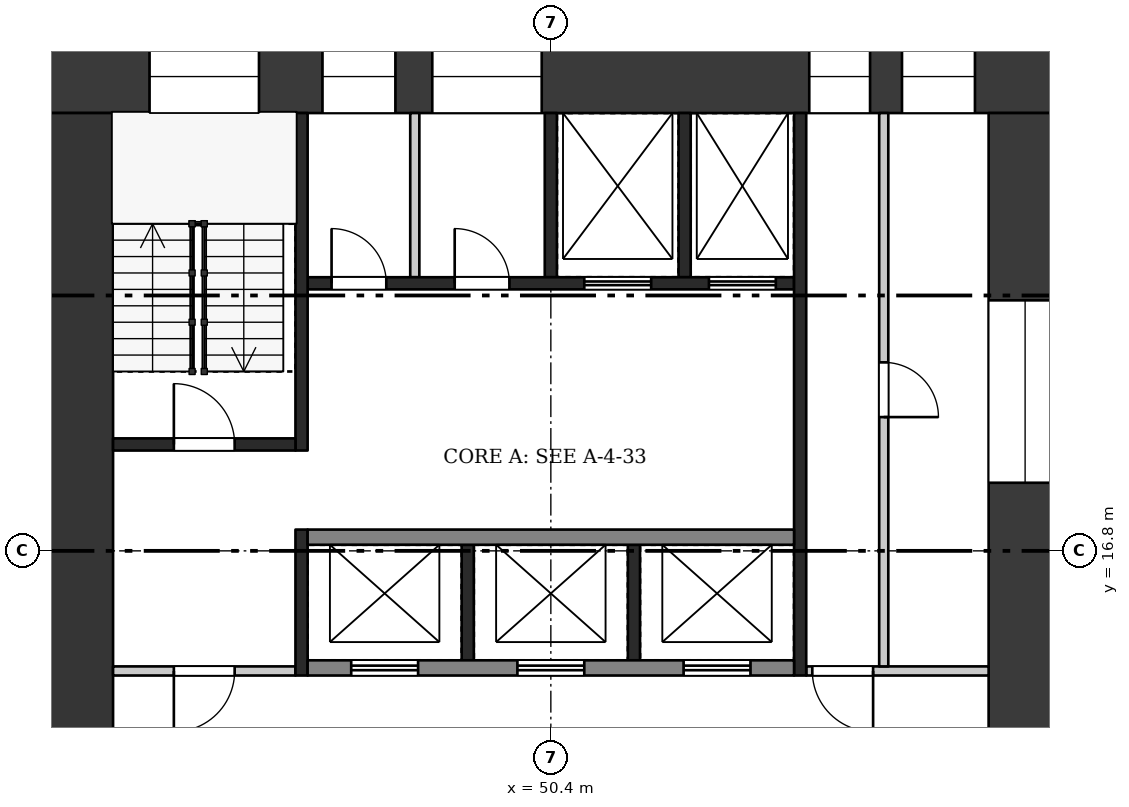
"""IFC4 building model, lengths in metres.
Left out: names, types, materials, properties, quantities, classifications, styles, units other than length and angle.
Written with IfcOpenShell. Run it as: python <this file> out.ifc"""

import sys

from ifc_helpers import new_model, si_unit, direction, frame, frame_2d, origin, place, context, subcontext, project, spatial, rectangle, extrude, element, fill, save


model = new_model("IFC4")
c1 = context("Model", 3, precision=1e-05, world=origin(), true_north=direction((0.0, 1.0)))
c2 = subcontext(c1, "Body", "Model", "MODEL_VIEW")
j1 = project(units=[si_unit("LENGTHUNIT", "METRE"), si_unit("PLANEANGLEUNIT", "RADIAN")], contexts=[c1])
p1 = place(None, origin())
s1 = spatial("IfcSite", under=j1, at=p1, CompositionType="ELEMENT")
p2 = place(p1, origin())
s2 = spatial("IfcBuilding", under=s1, at=p2, CompositionType="ELEMENT")
p3 = place(p2, frame((0.0, 0.0, 245.7)))
s3 = spatial("IfcBuildingStorey", under=s2, at=p3, CompositionType="ELEMENT", Elevation=245.7)
p4 = place(p3, frame((42.0, 24.6, 0.0), z_axis=(0.0, 0.0, 1.0), x_axis=(1.0, 0.0, 0.0)))
e1 = element("IfcWall", 1, at=p4, inside=s3, PredefinedType="SHEAR", context=c2, shape_type="SweptSolid", body=[
    extrude(rectangle(XDim=16.8, YDim=1.2, at=frame_2d((8.4, 0.0))), origin(), (0.0, 0.0, 1.0), 3.22),
])
p5 = place(p4, frame((1.8, 0.0, 0.5)))
e2 = element("IfcOpeningElement", 2, at=p5, cuts=e1, PredefinedType="OPENING", context=c2, shape_type="SweptSolid", body=[
    extrude(rectangle(XDim=1.8, YDim=2.4, at=frame_2d((0.9, 1.2))), frame((0.0, 0.61, 0.0), z_axis=(0.0, -1.0, 0.0), x_axis=(1.0, 0.0, 0.0)), (0.0, 0.0, 1.0), 1.22),
])
p6 = place(p4, frame((4.644, 0.0, 1.6)))
e3 = element("IfcOpeningElement", 3, at=p6, cuts=e1, PredefinedType="OPENING", context=c2, shape_type="SweptSolid", body=[
    extrude(rectangle(XDim=1.2, YDim=1.2, at=frame_2d((0.6, 0.6))), frame((0.0, 0.61, 0.0), z_axis=(0.0, -1.0, 0.0), x_axis=(1.0, 0.0, 0.0)), (0.0, 0.0, 1.0), 1.22),
])
p7 = place(p4, frame((6.45, 0.0, 1.6)))
e4 = element("IfcOpeningElement", 4, at=p7, cuts=e1, PredefinedType="OPENING", context=c2, shape_type="SweptSolid", body=[
    extrude(rectangle(XDim=1.8, YDim=1.2, at=frame_2d((0.9, 0.6))), frame((0.0, 0.61, 0.0), z_axis=(0.0, -1.0, 0.0), x_axis=(1.0, 0.0, 0.0)), (0.0, 0.0, 1.0), 1.22),
])
p8 = place(p4, frame((12.65, 0.0, 0.6)))
e5 = element("IfcOpeningElement", 5, at=p8, cuts=e1, PredefinedType="OPENING", context=c2, shape_type="SweptSolid", body=[
    extrude(rectangle(XDim=1.0, YDim=2.1, at=frame_2d((0.5, 1.05))), frame((0.0, 0.61, 0.0), z_axis=(0.0, -1.0, 0.0), x_axis=(1.0, 0.0, 0.0)), (0.0, 0.0, 1.0), 1.22),
])
p9 = place(p4, frame((14.175, 0.0, 1.6)))
e6 = element("IfcOpeningElement", 6, at=p9, cuts=e1, PredefinedType="OPENING", context=c2, shape_type="SweptSolid", body=[
    extrude(rectangle(XDim=1.2, YDim=1.2, at=frame_2d((0.6, 0.6))), frame((0.0, 0.61, 0.0), z_axis=(0.0, -1.0, 0.0), x_axis=(1.0, 0.0, 0.0)), (0.0, 0.0, 1.0), 1.22),
])
p10 = place(p3, frame((42.6, 9.6, 0.0), z_axis=(0.0, 0.0, 1.0), x_axis=(0.0, 1.0, 0.0)))
e7 = element("IfcWall", 7, at=p10, inside=s3, PredefinedType="SHEAR", context=c2, shape_type="SweptSolid", body=[
    extrude(rectangle(XDim=14.4, YDim=1.2, at=frame_2d((7.2, 0.0))), origin(), (0.0, 0.0, 1.0), 3.22),
])
p11 = place(p10, frame((2.1, 0.0, 0.0)))
e8 = element("IfcOpeningElement", 8, at=p11, cuts=e7, PredefinedType="OPENING", context=c2, shape_type="SweptSolid", body=[
    extrude(rectangle(XDim=1.8, YDim=2.1, at=frame_2d((0.9, 1.05))), frame((0.0, 0.61, 0.0), z_axis=(0.0, -1.0, 0.0), x_axis=(1.0, 0.0, 0.0)), (0.0, 0.0, 1.0), 1.22),
])
p12 = place(p3, frame((58.2, 9.6, 0.0), z_axis=(0.0, 0.0, 1.0), x_axis=(0.0, 1.0, 0.0)))
e9 = element("IfcWall", 9, at=p12, inside=s3, PredefinedType="SHEAR", context=c2, shape_type="SweptSolid", body=[
    extrude(rectangle(XDim=14.4, YDim=1.2, at=frame_2d((7.2, 0.0))), origin(), (0.0, 0.0, 1.0), 3.22),
])
p13 = place(p12, frame((1.105, 0.0, 0.6)))
e10 = element("IfcOpeningElement", 10, at=p13, cuts=e9, PredefinedType="OPENING", context=c2, shape_type="SweptSolid", body=[
    extrude(rectangle(XDim=3.0, YDim=2.1, at=frame_2d((1.5, 1.05))), frame((0.0, 0.61, 0.0), z_axis=(0.0, -1.0, 0.0), x_axis=(1.0, 0.0, 0.0)), (0.0, 0.0, 1.0), 1.22),
])
p14 = place(p12, frame((8.32, 0.0, 1.6)))
e11 = element("IfcOpeningElement", 11, at=p14, cuts=e9, PredefinedType="OPENING", context=c2, shape_type="SweptSolid", body=[
    extrude(rectangle(XDim=3.0, YDim=1.2, at=frame_2d((1.5, 0.6))), frame((0.0, 0.61, 0.0), z_axis=(0.0, -1.0, 0.0), x_axis=(1.0, 0.0, 0.0)), (0.0, 0.0, 1.0), 1.22),
])
for number, where, z_axis, x_axis in (
    (12, (49.033, 15.0, 0.0), (0.0, 0.0, 1.0), (0.0, 1.0, 0.0)),
    (13, (51.767, 15.0, 0.0), (0.0, 0.0, 1.0), (0.0, 1.0, 0.0)),
):
    element("IfcWall", number, at=place(p3, frame(where, z_axis=z_axis, x_axis=x_axis)), inside=s3, PredefinedType="SHEAR", context=c2, shape_type="SweptSolid", body=[
        extrude(rectangle(XDim=1.9, YDim=0.2, at=frame_2d((0.95, 0.0))), origin(), (0.0, 0.0, 1.0), 3.22),
    ])
p15 = place(p3, frame((46.4, 14.875, 0.0), z_axis=(0.0, 0.0, 1.0), x_axis=(1.0, 0.0, 0.0)))
e14 = element("IfcWall", 14, at=p15, inside=s3, PredefinedType="SHEAR", context=c2, shape_type="SweptSolid", body=[
    extrude(rectangle(XDim=8.0, YDim=0.25, at=frame_2d((4.0, 0.0))), origin(), (0.0, 0.0, 1.0), 3.22),
])
p16 = place(p15, frame((0.717, 0.0, 0.0)))
e15 = element("IfcOpeningElement", 15, at=p16, cuts=e14, PredefinedType="OPENING", context=c2, shape_type="SweptSolid", body=[
    extrude(rectangle(XDim=1.1, YDim=2.1, at=frame_2d((0.55, 1.05))), frame((0.0, 0.135, 0.0), z_axis=(0.0, -1.0, 0.0), x_axis=(1.0, 0.0, 0.0)), (0.0, 0.0, 1.0), 0.27),
])
p17 = place(p15, frame((3.45, 0.0, 0.0)))
e16 = element("IfcOpeningElement", 16, at=p17, cuts=e14, PredefinedType="OPENING", context=c2, shape_type="SweptSolid", body=[
    extrude(rectangle(XDim=1.1, YDim=2.1, at=frame_2d((0.55, 1.05))), frame((0.0, 0.135, 0.0), z_axis=(0.0, -1.0, 0.0), x_axis=(1.0, 0.0, 0.0)), (0.0, 0.0, 1.0), 0.27),
])
p18 = place(p15, frame((6.183, 0.0, 0.0)))
e17 = element("IfcOpeningElement", 17, at=p18, cuts=e14, PredefinedType="OPENING", context=c2, shape_type="SweptSolid", body=[
    extrude(rectangle(XDim=1.1, YDim=2.1, at=frame_2d((0.55, 1.05))), frame((0.0, 0.135, 0.0), z_axis=(0.0, -1.0, 0.0), x_axis=(1.0, 0.0, 0.0)), (0.0, 0.0, 1.0), 0.27),
])
p19 = place(p3, frame((46.4, 17.025, 0.0), z_axis=(0.0, 0.0, 1.0), x_axis=(1.0, 0.0, 0.0)))
e18 = element("IfcWall", 18, at=p19, inside=s3, PredefinedType="SHEAR", context=c2, shape_type="SweptSolid", body=[
    extrude(rectangle(XDim=8.0, YDim=0.25, at=frame_2d((4.0, 0.0))), origin(), (0.0, 0.0, 1.0), 3.22),
])
for number, where, z_axis, x_axis in (
    (19, (50.4, 21.3, 0.0), (0.0, 0.0, 1.0), (0.0, 1.0, 0.0)),
    (20, (52.6, 21.3, 0.0), (0.0, 0.0, 1.0), (0.0, 1.0, 0.0)),
):
    element("IfcWall", number, at=place(p3, frame(where, z_axis=z_axis, x_axis=x_axis)), inside=s3, PredefinedType="SHEAR", context=c2, shape_type="SweptSolid", body=[
        extrude(rectangle(XDim=2.7, YDim=0.2, at=frame_2d((1.35, 0.0))), origin(), (0.0, 0.0, 1.0), 3.22),
    ])
p20 = place(p3, frame((48.163, 21.3, 0.0), z_axis=(0.0, 0.0, 1.0), x_axis=(0.0, 1.0, 0.0)))
e21 = element("IfcWall", 21, at=p20, inside=s3, PredefinedType="PARTITIONING", context=c2, shape_type="SweptSolid", body=[
    extrude(rectangle(XDim=2.7, YDim=0.15, at=frame_2d((1.35, 0.0))), origin(), (0.0, 0.0, 1.0), 3.22),
])
p21 = place(p3, frame((46.4, 21.2, 0.0), z_axis=(0.0, 0.0, 1.0), x_axis=(1.0, 0.0, 0.0)))
e22 = element("IfcWall", 22, at=p21, inside=s3, PredefinedType="SHEAR", context=c2, shape_type="SweptSolid", body=[
    extrude(rectangle(XDim=8.0, YDim=0.2, at=frame_2d((4.0, 0.0))), origin(), (0.0, 0.0, 1.0), 3.22),
])
p22 = place(p21, frame((0.394, 0.0, 0.0)))
e23 = element("IfcOpeningElement", 23, at=p22, cuts=e22, PredefinedType="OPENING", context=c2, shape_type="SweptSolid", body=[
    extrude(rectangle(XDim=0.9, YDim=2.1, at=frame_2d((0.45, 1.05))), frame((0.0, 0.11, 0.0), z_axis=(0.0, -1.0, 0.0), x_axis=(1.0, 0.0, 0.0)), (0.0, 0.0, 1.0), 0.22),
])
p23 = place(p21, frame((2.419, 0.0, 0.0)))
e24 = element("IfcOpeningElement", 24, at=p23, cuts=e22, PredefinedType="OPENING", context=c2, shape_type="SweptSolid", body=[
    extrude(rectangle(XDim=0.9, YDim=2.1, at=frame_2d((0.45, 1.05))), frame((0.0, 0.11, 0.0), z_axis=(0.0, -1.0, 0.0), x_axis=(1.0, 0.0, 0.0)), (0.0, 0.0, 1.0), 0.22),
])
p24 = place(p21, frame((4.55, 0.0, 0.0)))
e25 = element("IfcOpeningElement", 25, at=p24, cuts=e22, PredefinedType="OPENING", context=c2, shape_type="SweptSolid", body=[
    extrude(rectangle(XDim=1.1, YDim=2.1, at=frame_2d((0.55, 1.05))), frame((0.0, 0.11, 0.0), z_axis=(0.0, -1.0, 0.0), x_axis=(1.0, 0.0, 0.0)), (0.0, 0.0, 1.0), 0.22),
])
p25 = place(p21, frame((6.6, 0.0, 0.0)))
e26 = element("IfcOpeningElement", 26, at=p25, cuts=e22, PredefinedType="OPENING", context=c2, shape_type="SweptSolid", body=[
    extrude(rectangle(XDim=1.1, YDim=2.1, at=frame_2d((0.55, 1.05))), frame((0.0, 0.11, 0.0), z_axis=(0.0, -1.0, 0.0), x_axis=(1.0, 0.0, 0.0)), (0.0, 0.0, 1.0), 0.22),
])
p26 = place(p3, frame((46.3, 14.75, 0.0), z_axis=(0.0, 0.0, 1.0), x_axis=(0.0, 1.0, 0.0)))
e27 = element("IfcWall", 27, at=p26, inside=s3, PredefinedType="SHEAR", context=c2, shape_type="SweptSolid", body=[
    extrude(rectangle(XDim=2.4, YDim=0.2, at=frame_2d((1.2, 0.0))), origin(), (0.0, 0.0, 1.0), 3.22),
])
p27 = place(p3, frame((46.3, 18.45, 0.0), z_axis=(0.0, 0.0, 1.0), x_axis=(0.0, 1.0, 0.0)))
e28 = element("IfcWall", 28, at=p27, inside=s3, PredefinedType="SHEAR", context=c2, shape_type="SweptSolid", body=[
    extrude(rectangle(XDim=5.55, YDim=0.2, at=frame_2d((2.775, 0.0))), origin(), (0.0, 0.0, 1.0), 3.22),
])
p28 = place(p3, frame((43.2, 14.825, 0.0), z_axis=(0.0, 0.0, 1.0), x_axis=(1.0, 0.0, 0.0)))
e29 = element("IfcWall", 29, at=p28, inside=s3, PredefinedType="PARTITIONING", context=c2, shape_type="SweptSolid", body=[
    extrude(rectangle(XDim=3.0, YDim=0.15, at=frame_2d((1.5, 0.0))), origin(), (0.0, 0.0, 1.0), 3.22),
])
p29 = place(p28, frame((1.0, 0.0, 0.0)))
e30 = element("IfcOpeningElement", 30, at=p29, cuts=e29, PredefinedType="OPENING", context=c2, shape_type="SweptSolid", body=[
    extrude(rectangle(XDim=1.0, YDim=2.1, at=frame_2d((0.5, 1.05))), frame((0.0, 0.085, 0.0), z_axis=(0.0, -1.0, 0.0), x_axis=(1.0, 0.0, 0.0)), (0.0, 0.0, 1.0), 0.17),
])
p30 = place(p3, frame((43.2, 18.55, 0.0), z_axis=(0.0, 0.0, 1.0), x_axis=(1.0, 0.0, 0.0)))
e31 = element("IfcWall", 31, at=p30, inside=s3, PredefinedType="SHEAR", context=c2, shape_type="SweptSolid", body=[
    extrude(rectangle(XDim=3.0, YDim=0.2, at=frame_2d((1.5, 0.0))), origin(), (0.0, 0.0, 1.0), 3.22),
])
p31 = place(p30, frame((1.0, 0.0, 0.0)))
e32 = element("IfcOpeningElement", 32, at=p31, cuts=e31, PredefinedType="OPENING", context=c2, shape_type="SweptSolid", body=[
    extrude(rectangle(XDim=1.0, YDim=2.1, at=frame_2d((0.5, 1.05))), frame((0.0, 0.11, 0.0), z_axis=(0.0, -1.0, 0.0), x_axis=(1.0, 0.0, 0.0)), (0.0, 0.0, 1.0), 0.22),
])
p32 = place(p3, frame((54.5, 14.75, 0.0), z_axis=(0.0, 0.0, 1.0), x_axis=(0.0, 1.0, 0.0)))
e33 = element("IfcWall", 33, at=p32, inside=s3, PredefinedType="SHEAR", context=c2, shape_type="SweptSolid", body=[
    extrude(rectangle(XDim=9.25, YDim=0.2, at=frame_2d((4.625, 0.0))), origin(), (0.0, 0.0, 1.0), 3.22),
])
p33 = place(p3, frame((54.6, 14.825, 0.0), z_axis=(0.0, 0.0, 1.0), x_axis=(1.0, 0.0, 0.0)))
e34 = element("IfcWall", 34, at=p33, inside=s3, PredefinedType="PARTITIONING", context=c2, shape_type="SweptSolid", body=[
    extrude(rectangle(XDim=3.0, YDim=0.15, at=frame_2d((1.5, 0.0))), origin(), (0.0, 0.0, 1.0), 3.22),
])
p34 = place(p33, frame((0.1, 0.0, 0.0)))
e35 = element("IfcOpeningElement", 35, at=p34, cuts=e34, PredefinedType="OPENING", context=c2, shape_type="SweptSolid", body=[
    extrude(rectangle(XDim=1.0, YDim=2.1, at=frame_2d((0.5, 1.05))), frame((0.0, 0.085, 0.0), z_axis=(0.0, -1.0, 0.0), x_axis=(1.0, 0.0, 0.0)), (0.0, 0.0, 1.0), 0.17),
])
p35 = place(p3, frame((55.875, 14.9, 0.0), z_axis=(0.0, 0.0, 1.0), x_axis=(0.0, 1.0, 0.0)))
e36 = element("IfcWall", 36, at=p35, inside=s3, PredefinedType="PARTITIONING", context=c2, shape_type="SweptSolid", body=[
    extrude(rectangle(XDim=9.1, YDim=0.15, at=frame_2d((4.55, 0.0))), origin(), (0.0, 0.0, 1.0), 3.22),
])
p36 = place(p35, frame((4.1, 0.0, 0.0)))
e37 = element("IfcOpeningElement", 37, at=p36, cuts=e36, PredefinedType="OPENING", context=c2, shape_type="SweptSolid", body=[
    extrude(rectangle(XDim=0.9, YDim=2.1, at=frame_2d((0.45, 1.05))), frame((0.0, 0.085, 0.0), z_axis=(0.0, -1.0, 0.0), x_axis=(1.0, 0.0, 0.0)), (0.0, 0.0, 1.0), 0.17),
])
p37 = place(p16, origin())
e38 = element("IfcDoor", 38, at=p37, inside=s3, OperationType="DOUBLE_DOOR_SLIDING", PredefinedType="DOOR", context=c2, shape_type="SweptSolid", body=[
    extrude(rectangle(XDim=1.1, YDim=2.1, at=frame_2d((0.55, 1.05))), frame((0.0, 0.025, 0.0), z_axis=(0.0, -1.0, 0.0), x_axis=(1.0, 0.0, 0.0)), (0.0, 0.0, 1.0), 0.05),
])
fill(e15, e38)
p38 = place(p17, origin())
e39 = element("IfcDoor", 39, at=p38, inside=s3, OperationType="DOUBLE_DOOR_SLIDING", PredefinedType="DOOR", context=c2, shape_type="SweptSolid", body=[
    extrude(rectangle(XDim=1.1, YDim=2.1, at=frame_2d((0.55, 1.05))), frame((0.0, 0.025, 0.0), z_axis=(0.0, -1.0, 0.0), x_axis=(1.0, 0.0, 0.0)), (0.0, 0.0, 1.0), 0.05),
])
fill(e16, e39)
p39 = place(p18, origin())
e40 = element("IfcDoor", 40, at=p39, inside=s3, OperationType="DOUBLE_DOOR_SLIDING", PredefinedType="DOOR", context=c2, shape_type="SweptSolid", body=[
    extrude(rectangle(XDim=1.1, YDim=2.1, at=frame_2d((0.55, 1.05))), frame((0.0, 0.025, 0.0), z_axis=(0.0, -1.0, 0.0), x_axis=(1.0, 0.0, 0.0)), (0.0, 0.0, 1.0), 0.05),
])
fill(e17, e40)
p40 = place(p22, origin())
e41 = element("IfcDoor", 41, at=p40, inside=s3, OperationType="SINGLE_SWING_LEFT", PredefinedType="DOOR", context=c2, shape_type="SweptSolid", body=[
    extrude(rectangle(XDim=0.9, YDim=2.1, at=frame_2d((0.45, 1.05))), frame((0.0, 0.025, 0.0), z_axis=(0.0, -1.0, 0.0), x_axis=(1.0, 0.0, 0.0)), (0.0, 0.0, 1.0), 0.05),
])
fill(e23, e41)
p41 = place(p23, origin())
e42 = element("IfcDoor", 42, at=p41, inside=s3, OperationType="SINGLE_SWING_LEFT", PredefinedType="DOOR", context=c2, shape_type="SweptSolid", body=[
    extrude(rectangle(XDim=0.9, YDim=2.1, at=frame_2d((0.45, 1.05))), frame((0.0, 0.025, 0.0), z_axis=(0.0, -1.0, 0.0), x_axis=(1.0, 0.0, 0.0)), (0.0, 0.0, 1.0), 0.05),
])
fill(e24, e42)
p42 = place(p24, origin())
e43 = element("IfcDoor", 43, at=p42, inside=s3, OperationType="DOUBLE_DOOR_SLIDING", PredefinedType="DOOR", context=c2, shape_type="SweptSolid", body=[
    extrude(rectangle(XDim=1.1, YDim=2.1, at=frame_2d((0.55, 1.05))), frame((0.0, 0.025, 0.0), z_axis=(0.0, -1.0, 0.0), x_axis=(1.0, 0.0, 0.0)), (0.0, 0.0, 1.0), 0.05),
])
fill(e25, e43)
p43 = place(p25, origin())
e44 = element("IfcDoor", 44, at=p43, inside=s3, OperationType="DOUBLE_DOOR_SLIDING", PredefinedType="DOOR", context=c2, shape_type="SweptSolid", body=[
    extrude(rectangle(XDim=1.1, YDim=2.1, at=frame_2d((0.55, 1.05))), frame((0.0, 0.025, 0.0), z_axis=(0.0, -1.0, 0.0), x_axis=(1.0, 0.0, 0.0)), (0.0, 0.0, 1.0), 0.05),
])
fill(e26, e44)
p44 = place(p29, frame((1.0, 0.0, 0.0), z_axis=(0.0, 0.0, 1.0), x_axis=(-1.0, 0.0, 0.0)))
e45 = element("IfcDoor", 45, at=p44, inside=s3, OperationType="SINGLE_SWING_RIGHT", PredefinedType="DOOR", context=c2, shape_type="SweptSolid", body=[
    extrude(rectangle(XDim=1.0, YDim=2.1, at=frame_2d((0.5, 1.05))), frame((0.0, 0.025, 0.0), z_axis=(0.0, -1.0, 0.0), x_axis=(1.0, 0.0, 0.0)), (0.0, 0.0, 1.0), 0.05),
])
fill(e30, e45)
p45 = place(p31, origin())
e46 = element("IfcDoor", 46, at=p45, inside=s3, OperationType="SINGLE_SWING_LEFT", PredefinedType="DOOR", context=c2, shape_type="SweptSolid", body=[
    extrude(rectangle(XDim=1.0, YDim=2.1, at=frame_2d((0.5, 1.05))), frame((0.0, 0.025, 0.0), z_axis=(0.0, -1.0, 0.0), x_axis=(1.0, 0.0, 0.0)), (0.0, 0.0, 1.0), 0.05),
])
fill(e32, e46)
p46 = place(p34, frame((1.0, 0.0, 0.0), z_axis=(0.0, 0.0, 1.0), x_axis=(-1.0, 0.0, 0.0)))
e47 = element("IfcDoor", 47, at=p46, inside=s3, OperationType="SINGLE_SWING_LEFT", PredefinedType="DOOR", context=c2, shape_type="SweptSolid", body=[
    extrude(rectangle(XDim=1.0, YDim=2.1, at=frame_2d((0.5, 1.05))), frame((0.0, 0.025, 0.0), z_axis=(0.0, -1.0, 0.0), x_axis=(1.0, 0.0, 0.0)), (0.0, 0.0, 1.0), 0.05),
])
fill(e35, e47)
p47 = place(p36, frame((0.9, 0.0, 0.0), z_axis=(0.0, 0.0, 1.0), x_axis=(-1.0, 0.0, 0.0)))
e48 = element("IfcDoor", 48, at=p47, inside=s3, OperationType="SINGLE_SWING_RIGHT", PredefinedType="DOOR", context=c2, shape_type="SweptSolid", body=[
    extrude(rectangle(XDim=0.9, YDim=2.1, at=frame_2d((0.45, 1.05))), frame((0.0, 0.025, 0.0), z_axis=(0.0, -1.0, 0.0), x_axis=(1.0, 0.0, 0.0)), (0.0, 0.0, 1.0), 0.05),
])
fill(e37, e48)
p48 = place(p5, origin())
e49 = element("IfcWindow", 49, at=p48, inside=s3, PartitioningType="SINGLE_PANEL", PredefinedType="WINDOW", context=c2, shape_type="SweptSolid", body=[
    extrude(rectangle(XDim=1.8, YDim=2.4, at=frame_2d((0.9, 1.2))), frame((0.0, 0.03, 0.0), z_axis=(0.0, -1.0, 0.0), x_axis=(1.0, 0.0, 0.0)), (0.0, 0.0, 1.0), 0.06),
])
fill(e2, e49)
p49 = place(p6, origin())
e50 = element("IfcWindow", 50, at=p49, inside=s3, PartitioningType="SINGLE_PANEL", PredefinedType="WINDOW", context=c2, shape_type="SweptSolid", body=[
    extrude(rectangle(XDim=1.2, YDim=1.2, at=frame_2d((0.6, 0.6))), frame((0.0, 0.03, 0.0), z_axis=(0.0, -1.0, 0.0), x_axis=(1.0, 0.0, 0.0)), (0.0, 0.0, 1.0), 0.06),
])
fill(e3, e50)
p50 = place(p7, origin())
e51 = element("IfcWindow", 51, at=p50, inside=s3, PartitioningType="SINGLE_PANEL", PredefinedType="WINDOW", context=c2, shape_type="SweptSolid", body=[
    extrude(rectangle(XDim=1.8, YDim=1.2, at=frame_2d((0.9, 0.6))), frame((0.0, 0.03, 0.0), z_axis=(0.0, -1.0, 0.0), x_axis=(1.0, 0.0, 0.0)), (0.0, 0.0, 1.0), 0.06),
])
fill(e4, e51)
p51 = place(p8, origin())
e52 = element("IfcWindow", 52, at=p51, inside=s3, PartitioningType="SINGLE_PANEL", PredefinedType="WINDOW", context=c2, shape_type="SweptSolid", body=[
    extrude(rectangle(XDim=1.0, YDim=2.1, at=frame_2d((0.5, 1.05))), frame((0.0, 0.03, 0.0), z_axis=(0.0, -1.0, 0.0), x_axis=(1.0, 0.0, 0.0)), (0.0, 0.0, 1.0), 0.06),
])
fill(e5, e52)
p52 = place(p9, origin())
e53 = element("IfcWindow", 53, at=p52, inside=s3, PartitioningType="SINGLE_PANEL", PredefinedType="WINDOW", context=c2, shape_type="SweptSolid", body=[
    extrude(rectangle(XDim=1.2, YDim=1.2, at=frame_2d((0.6, 0.6))), frame((0.0, 0.03, 0.0), z_axis=(0.0, -1.0, 0.0), x_axis=(1.0, 0.0, 0.0)), (0.0, 0.0, 1.0), 0.06),
])
fill(e6, e53)
p53 = place(p14, origin())
e54 = element("IfcWindow", 54, at=p53, inside=s3, PartitioningType="SINGLE_PANEL", PredefinedType="WINDOW", context=c2, shape_type="SweptSolid", body=[
    extrude(rectangle(XDim=3.0, YDim=1.2, at=frame_2d((1.5, 0.6))), frame((0.0, 0.03, 0.0), z_axis=(0.0, -1.0, 0.0), x_axis=(1.0, 0.0, 0.0)), (0.0, 0.0, 1.0), 0.06),
])
fill(e11, e54)
save(model, sys.argv[1])
